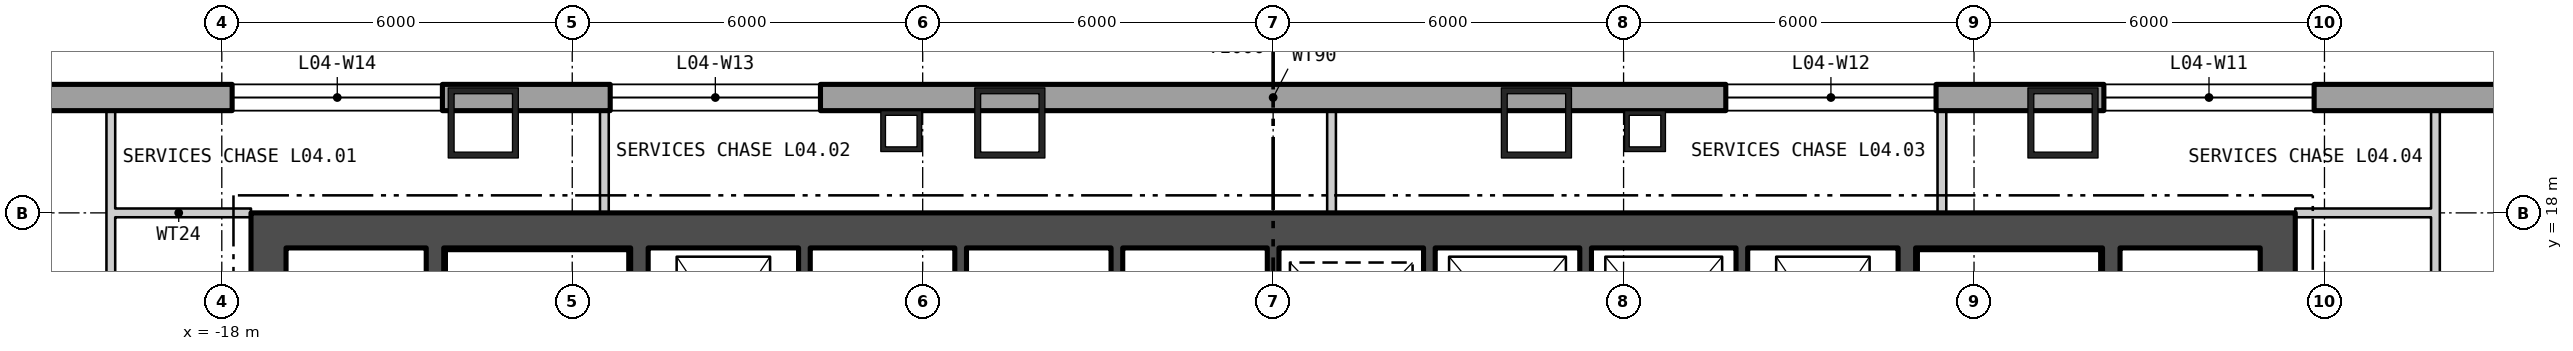
"""IFC4 building model, lengths in metres.
Left out: names, types, materials, properties, quantities, classifications, styles, units other than length and angle.
Written with IfcOpenShell. Run it as: python <this file> out.ifc"""

import sys

from ifc_helpers import new_model, si_unit, direction, frame, frame_2d, origin, origin_2d, place, context, subcontext, project, spatial, polyline, rectangle, hollow_rectangle, outline, extrude, element, fill, save


model = new_model("IFC4")
c1 = context("Model", 3, precision=1e-05, world=origin(), true_north=direction((0.0, 1.0)))
c2 = subcontext(c1, "Body", "Model", "MODEL_VIEW")
j1 = project(units=[si_unit("LENGTHUNIT", "METRE"), si_unit("PLANEANGLEUNIT", "RADIAN")], contexts=[c1])
p1 = place(None, origin())
s1 = spatial("IfcSite", under=j1, at=p1, CompositionType="ELEMENT")
p2 = place(p1, origin())
s2 = spatial("IfcBuilding", under=s1, at=p2, CompositionType="ELEMENT")
p3 = place(p2, frame((0.0, 0.0, 23.7)))
s3 = spatial("IfcBuildingStorey", under=s2, at=p3, CompositionType="ELEMENT", Elevation=23.7)
for number, where, z_axis, x_axis in (
    (1, (13.523, 19.54, 0.0), (0.0, 0.0, 1.0), (-1.0, 0.0, 0.0)),
    (2, (4.508, 19.54, 0.0), (0.0, 0.0, 1.0), (-1.0, 0.0, 0.0)),
    (3, (-4.508, 19.54, 0.0), (0.0, 0.0, 1.0), (-1.0, 0.0, 0.0)),
    (4, (-13.523, 19.54, 0.0), (0.0, 0.0, 1.0), (-1.0, 0.0, 0.0)),
):
    element("IfcColumn", number, at=place(p3, frame(where, z_axis=z_axis, x_axis=x_axis)), inside=s3, PredefinedType="COLUMN", context=c2, shape_type="SweptSolid", body=[
        extrude(hollow_rectangle(XDim=1.2, YDim=1.2, WallThickness=0.1, at=origin_2d()), origin(), (0.0, 0.0, 1.0), 5.1),
    ])
for number, where, z_axis, x_axis in (
    (5, (6.367, 19.4, 0.0), (0.0, 0.0, 1.0), (-1.0, 0.0, 0.0)),
    (6, (-6.367, 19.4, 0.0), (0.0, 0.0, 1.0), (-1.0, 0.0, 0.0)),
):
    element("IfcColumn", number, at=place(p3, frame(where, z_axis=z_axis, x_axis=x_axis)), inside=s3, PredefinedType="COLUMN", context=c2, shape_type="SweptSolid", body=[
        extrude(hollow_rectangle(XDim=0.7, YDim=0.7, WallThickness=0.08, at=origin_2d()), origin(), (0.0, 0.0, 1.0), 4.85),
    ])
p4 = place(p3, frame((38.775, 19.975, -0.4), z_axis=(0.0, 0.0, 1.0), x_axis=(-1.0, 0.0, 0.0)))
e7 = element("IfcWall", 7, at=p4, inside=s3, PredefinedType="SOLIDWALL", context=c2, shape_type="SweptSolid", body=[
    extrude(outline(polyline([(-0.225, -0.225), (77.775, -0.225), (77.325, 0.225), (0.225, 0.225), (-0.225, -0.225)])), origin(), (0.0, 0.0, 1.0), 5.1),
])
p5 = place(p4, frame((1.958, 0.0, 1.3)))
e8 = element("IfcOpeningElement", 8, at=p5, cuts=e7, PredefinedType="OPENING", context=c2, shape_type="SweptSolid", body=[
    extrude(rectangle(XDim=3.6, YDim=3.2, at=frame_2d((1.8, 1.6))), frame((0.0, 0.235, 0.0), z_axis=(0.0, -1.0, 0.0), x_axis=(1.0, 0.0, 0.0)), (0.0, 0.0, 1.0), 0.47),
])
p6 = place(p4, frame((8.325, 0.0, 1.3)))
e9 = element("IfcOpeningElement", 9, at=p6, cuts=e7, PredefinedType="OPENING", context=c2, shape_type="SweptSolid", body=[
    extrude(rectangle(XDim=3.6, YDim=3.2, at=frame_2d((1.8, 1.6))), frame((0.0, 0.235, 0.0), z_axis=(0.0, -1.0, 0.0), x_axis=(1.0, 0.0, 0.0)), (0.0, 0.0, 1.0), 0.47),
])
p7 = place(p4, frame((20.952, 0.0, 1.3)))
e10 = element("IfcOpeningElement", 10, at=p7, cuts=e7, PredefinedType="OPENING", context=c2, shape_type="SweptSolid", body=[
    extrude(rectangle(XDim=3.6, YDim=3.2, at=frame_2d((1.8, 1.6))), frame((0.0, 0.235, 0.0), z_axis=(0.0, -1.0, 0.0), x_axis=(1.0, 0.0, 0.0)), (0.0, 0.0, 1.0), 0.47),
])
p8 = place(p4, frame((27.425, 0.0, 1.3)))
e11 = element("IfcOpeningElement", 11, at=p8, cuts=e7, PredefinedType="OPENING", context=c2, shape_type="SweptSolid", body=[
    extrude(rectangle(XDim=3.6, YDim=3.2, at=frame_2d((1.8, 1.6))), frame((0.0, 0.235, 0.0), z_axis=(0.0, -1.0, 0.0), x_axis=(1.0, 0.0, 0.0)), (0.0, 0.0, 1.0), 0.47),
])
p9 = place(p4, frame((46.525, 0.0, 1.3)))
e12 = element("IfcOpeningElement", 12, at=p9, cuts=e7, PredefinedType="OPENING", context=c2, shape_type="SweptSolid", body=[
    extrude(rectangle(XDim=3.6, YDim=3.2, at=frame_2d((1.8, 1.6))), frame((0.0, 0.235, 0.0), z_axis=(0.0, -1.0, 0.0), x_axis=(1.0, 0.0, 0.0)), (0.0, 0.0, 1.0), 0.47),
])
p10 = place(p4, frame((52.998, 0.0, 1.3)))
e13 = element("IfcOpeningElement", 13, at=p10, cuts=e7, PredefinedType="OPENING", context=c2, shape_type="SweptSolid", body=[
    extrude(rectangle(XDim=3.6, YDim=3.2, at=frame_2d((1.8, 1.6))), frame((0.0, 0.235, 0.0), z_axis=(0.0, -1.0, 0.0), x_axis=(1.0, 0.0, 0.0)), (0.0, 0.0, 1.0), 0.47),
])
p11 = place(p4, frame((65.625, 0.0, 1.3)))
e14 = element("IfcOpeningElement", 14, at=p11, cuts=e7, PredefinedType="OPENING", context=c2, shape_type="SweptSolid", body=[
    extrude(rectangle(XDim=3.6, YDim=3.2, at=frame_2d((1.8, 1.6))), frame((0.0, 0.235, 0.0), z_axis=(0.0, -1.0, 0.0), x_axis=(1.0, 0.0, 0.0)), (0.0, 0.0, 1.0), 0.47),
])
p12 = place(p4, frame((71.992, 0.0, 1.3)))
e15 = element("IfcOpeningElement", 15, at=p12, cuts=e7, PredefinedType="OPENING", context=c2, shape_type="SweptSolid", body=[
    extrude(rectangle(XDim=3.6, YDim=3.2, at=frame_2d((1.8, 1.6))), frame((0.0, 0.235, 0.0), z_axis=(0.0, -1.0, 0.0), x_axis=(1.0, 0.0, 0.0)), (0.0, 0.0, 1.0), 0.47),
])
p13 = place(p3, frame((-17.5, 17.7, 0.0), z_axis=(0.0, 0.0, 1.0), x_axis=(1.0, 0.0, 0.0)))
e16 = element("IfcWall", 16, at=p13, inside=s3, PredefinedType="SHEAR", context=c2, shape_type="SweptSolid", body=[
    extrude(rectangle(XDim=35.0, YDim=0.6, at=frame_2d((17.5, 0.0))), origin(), (0.0, 0.0, 1.0), 4.85),
])
p14 = place(p3, frame((-17.2, 0.6, 0.0), z_axis=(0.0, 0.0, 1.0), x_axis=(0.0, 1.0, 0.0)))
e17 = element("IfcWall", 17, at=p14, inside=s3, PredefinedType="SHEAR", context=c2, shape_type="SweptSolid", body=[
    extrude(rectangle(XDim=16.8, YDim=0.6, at=frame_2d((8.4, 0.0))), origin(), (0.0, 0.0, 1.0), 4.85),
])
p15 = place(p14, frame((5.7, 0.0, 0.0)))
e18 = element("IfcOpeningElement", 18, at=p15, cuts=e17, PredefinedType="OPENING", context=c2, shape_type="SweptSolid", body=[
    extrude(rectangle(XDim=1.5, YDim=2.1, at=frame_2d((0.75, 1.05))), frame((0.0, 0.31, 0.0), z_axis=(0.0, -1.0, 0.0), x_axis=(1.0, 0.0, 0.0)), (0.0, 0.0, 1.0), 0.62),
])
p16 = place(p14, frame((0.4, 0.0, 0.0)))
e19 = element("IfcOpeningElement", 19, at=p16, cuts=e17, PredefinedType="OPENING", context=c2, shape_type="SweptSolid", body=[
    extrude(rectangle(XDim=0.9, YDim=2.1, at=frame_2d((0.45, 1.05))), frame((0.0, 0.31, 0.0), z_axis=(0.0, -1.0, 0.0), x_axis=(1.0, 0.0, 0.0)), (0.0, 0.0, 1.0), 0.62),
])
p17 = place(p14, frame((3.15, 0.0, 0.0)))
e20 = element("IfcOpeningElement", 20, at=p17, cuts=e17, PredefinedType="OPENING", context=c2, shape_type="SweptSolid", body=[
    extrude(rectangle(XDim=0.9, YDim=2.1, at=frame_2d((0.45, 1.05))), frame((0.0, 0.31, 0.0), z_axis=(0.0, -1.0, 0.0), x_axis=(1.0, 0.0, 0.0)), (0.0, 0.0, 1.0), 0.62),
])
p18 = place(p14, frame((7.816, 0.0, 0.0)))
e21 = element("IfcOpeningElement", 21, at=p18, cuts=e17, PredefinedType="OPENING", context=c2, shape_type="SweptSolid", body=[
    extrude(rectangle(XDim=1.0, YDim=2.1, at=frame_2d((0.5, 1.05))), frame((0.0, 0.31, 0.0), z_axis=(0.0, -1.0, 0.0), x_axis=(1.0, 0.0, 0.0)), (0.0, 0.0, 1.0), 0.62),
])
p19 = place(p14, frame((12.666, 0.0, 0.0)))
e22 = element("IfcOpeningElement", 22, at=p19, cuts=e17, PredefinedType="OPENING", context=c2, shape_type="SweptSolid", body=[
    extrude(rectangle(XDim=0.9, YDim=2.1, at=frame_2d((0.45, 1.05))), frame((0.0, 0.31, 0.0), z_axis=(0.0, -1.0, 0.0), x_axis=(1.0, 0.0, 0.0)), (0.0, 0.0, 1.0), 0.62),
])
p20 = place(p3, frame((17.2, 0.6, 0.0), z_axis=(0.0, 0.0, 1.0), x_axis=(0.0, 1.0, 0.0)))
e23 = element("IfcWall", 23, at=p20, inside=s3, PredefinedType="SHEAR", context=c2, shape_type="SweptSolid", body=[
    extrude(rectangle(XDim=16.8, YDim=0.6, at=frame_2d((8.4, 0.0))), origin(), (0.0, 0.0, 1.0), 4.85),
])
p21 = place(p20, frame((5.7, 0.0, 0.0)))
e24 = element("IfcOpeningElement", 24, at=p21, cuts=e23, PredefinedType="OPENING", context=c2, shape_type="SweptSolid", body=[
    extrude(rectangle(XDim=1.5, YDim=2.1, at=frame_2d((0.75, 1.05))), frame((0.0, 0.31, 0.0), z_axis=(0.0, -1.0, 0.0), x_axis=(1.0, 0.0, 0.0)), (0.0, 0.0, 1.0), 0.62),
])
p22 = place(p20, frame((1.488, 0.0, 0.0)))
e25 = element("IfcOpeningElement", 25, at=p22, cuts=e23, PredefinedType="OPENING", context=c2, shape_type="SweptSolid", body=[
    extrude(rectangle(XDim=0.9, YDim=2.1, at=frame_2d((0.45, 1.05))), frame((0.0, 0.31, 0.0), z_axis=(0.0, -1.0, 0.0), x_axis=(1.0, 0.0, 0.0)), (0.0, 0.0, 1.0), 0.62),
])
p23 = place(p20, frame((4.338, 0.0, 0.0)))
e26 = element("IfcOpeningElement", 26, at=p23, cuts=e23, PredefinedType="OPENING", context=c2, shape_type="SweptSolid", body=[
    extrude(rectangle(XDim=0.9, YDim=2.1, at=frame_2d((0.45, 1.05))), frame((0.0, 0.31, 0.0), z_axis=(0.0, -1.0, 0.0), x_axis=(1.0, 0.0, 0.0)), (0.0, 0.0, 1.0), 0.62),
])
p24 = place(p20, frame((10.483, 0.0, 0.0)))
e27 = element("IfcOpeningElement", 27, at=p24, cuts=e23, PredefinedType="OPENING", context=c2, shape_type="SweptSolid", body=[
    extrude(rectangle(XDim=0.9, YDim=2.1, at=frame_2d((0.45, 1.05))), frame((0.0, 0.31, 0.0), z_axis=(0.0, -1.0, 0.0), x_axis=(1.0, 0.0, 0.0)), (0.0, 0.0, 1.0), 0.62),
])
p25 = place(p20, frame((15.233, 0.0, 0.0)))
e28 = element("IfcOpeningElement", 28, at=p25, cuts=e23, PredefinedType="OPENING", context=c2, shape_type="SweptSolid", body=[
    extrude(rectangle(XDim=1.0, YDim=2.1, at=frame_2d((0.5, 1.05))), frame((0.0, 0.31, 0.0), z_axis=(0.0, -1.0, 0.0), x_axis=(1.0, 0.0, 0.0)), (0.0, 0.0, 1.0), 0.62),
])
p26 = place(p3, frame((-10.85, 0.6, 0.0), z_axis=(0.0, 0.0, 1.0), x_axis=(0.0, 1.0, 0.0)))
e29 = element("IfcWall", 29, at=p26, inside=s3, PredefinedType="SHEAR", context=c2, shape_type="SweptSolid", body=[
    extrude(rectangle(XDim=16.8, YDim=0.3, at=frame_2d((8.4, 0.0))), origin(), (0.0, 0.0, 1.0), 4.85),
])
p27 = place(p26, frame((5.075, 0.0, 0.0)))
e30 = element("IfcOpeningElement", 30, at=p27, cuts=e29, PredefinedType="OPENING", context=c2, shape_type="SweptSolid", body=[
    extrude(rectangle(XDim=1.25, YDim=2.1, at=frame_2d((0.625, 1.05))), frame((0.0, 0.16, 0.0), z_axis=(0.0, -1.0, 0.0), x_axis=(1.0, 0.0, 0.0)), (0.0, 0.0, 1.0), 0.32),
])
p28 = place(p26, frame((1.525, 0.0, 0.0)))
e31 = element("IfcOpeningElement", 31, at=p28, cuts=e29, PredefinedType="OPENING", context=c2, shape_type="SweptSolid", body=[
    extrude(rectangle(XDim=1.0, YDim=2.1, at=frame_2d((0.5, 1.05))), frame((0.0, 0.16, 0.0), z_axis=(0.0, -1.0, 0.0), x_axis=(1.0, 0.0, 0.0)), (0.0, 0.0, 1.0), 0.32),
])
p29 = place(p3, frame((-14.35, 0.6, 0.0), z_axis=(0.0, 0.0, 1.0), x_axis=(0.0, 1.0, 0.0)))
e32 = element("IfcWall", 32, at=p29, inside=s3, PredefinedType="SHEAR", context=c2, shape_type="SweptSolid", body=[
    extrude(rectangle(XDim=16.8, YDim=0.3, at=frame_2d((8.4, 0.0))), origin(), (0.0, 0.0, 1.0), 4.85),
])
p30 = place(p29, frame((5.7, 0.0, 0.0)))
e33 = element("IfcOpeningElement", 33, at=p30, cuts=e32, PredefinedType="OPENING", context=c2, shape_type="SweptSolid", body=[
    extrude(rectangle(XDim=1.5, YDim=2.1, at=frame_2d((0.75, 1.05))), frame((0.0, 0.16, 0.0), z_axis=(0.0, -1.0, 0.0), x_axis=(1.0, 0.0, 0.0)), (0.0, 0.0, 1.0), 0.32),
])
p31 = place(p3, frame((10.85, 0.6, 0.0), z_axis=(0.0, 0.0, 1.0), x_axis=(0.0, 1.0, 0.0)))
e34 = element("IfcWall", 34, at=p31, inside=s3, PredefinedType="SHEAR", context=c2, shape_type="SweptSolid", body=[
    extrude(rectangle(XDim=16.8, YDim=0.3, at=frame_2d((8.4, 0.0))), origin(), (0.0, 0.0, 1.0), 4.85),
])
p32 = place(p31, frame((5.075, 0.0, 0.0)))
e35 = element("IfcOpeningElement", 35, at=p32, cuts=e34, PredefinedType="OPENING", context=c2, shape_type="SweptSolid", body=[
    extrude(rectangle(XDim=1.25, YDim=2.1, at=frame_2d((0.625, 1.05))), frame((0.0, 0.16, 0.0), z_axis=(0.0, -1.0, 0.0), x_axis=(1.0, 0.0, 0.0)), (0.0, 0.0, 1.0), 0.32),
])
p33 = place(p31, frame((1.525, 0.0, 0.0)))
e36 = element("IfcOpeningElement", 36, at=p33, cuts=e34, PredefinedType="OPENING", context=c2, shape_type="SweptSolid", body=[
    extrude(rectangle(XDim=1.0, YDim=2.1, at=frame_2d((0.5, 1.05))), frame((0.0, 0.16, 0.0), z_axis=(0.0, -1.0, 0.0), x_axis=(1.0, 0.0, 0.0)), (0.0, 0.0, 1.0), 0.32),
])
p34 = place(p3, frame((14.35, 0.6, 0.0), z_axis=(0.0, 0.0, 1.0), x_axis=(0.0, 1.0, 0.0)))
e37 = element("IfcWall", 37, at=p34, inside=s3, PredefinedType="SHEAR", context=c2, shape_type="SweptSolid", body=[
    extrude(rectangle(XDim=16.8, YDim=0.3, at=frame_2d((8.4, 0.0))), origin(), (0.0, 0.0, 1.0), 4.85),
])
p35 = place(p34, frame((5.7, 0.0, 0.0)))
e38 = element("IfcOpeningElement", 38, at=p35, cuts=e37, PredefinedType="OPENING", context=c2, shape_type="SweptSolid", body=[
    extrude(rectangle(XDim=1.5, YDim=2.1, at=frame_2d((0.75, 1.05))), frame((0.0, 0.16, 0.0), z_axis=(0.0, -1.0, 0.0), x_axis=(1.0, 0.0, 0.0)), (0.0, 0.0, 1.0), 0.32),
])
for number, where, z_axis, x_axis in (
    (39, (-8.025, 14.7, 0.0), (0.0, 0.0, 1.0), (0.0, 1.0, 0.0)),
    (40, (-5.35, 14.7, 0.0), (0.0, 0.0, 1.0), (0.0, 1.0, 0.0)),
    (41, (-2.675, 14.7, 0.0), (0.0, 0.0, 1.0), (0.0, 1.0, 0.0)),
    (42, (0.0, 14.7, 0.0), (0.0, 0.0, 1.0), (0.0, 1.0, 0.0)),
    (43, (2.675, 14.7, 0.0), (0.0, 0.0, 1.0), (0.0, 1.0, 0.0)),
    (44, (5.35, 14.7, 0.0), (0.0, 0.0, 1.0), (0.0, 1.0, 0.0)),
    (45, (8.025, 14.7, 0.0), (0.0, 0.0, 1.0), (0.0, 1.0, 0.0)),
):
    element("IfcWall", number, at=place(p3, frame(where, z_axis=z_axis, x_axis=x_axis)), inside=s3, PredefinedType="SHEAR", context=c2, shape_type="SweptSolid", body=[
        extrude(rectangle(XDim=2.7, YDim=0.2, at=frame_2d((1.35, 0.0))), origin(), (0.0, 0.0, 1.0), 4.85),
    ])
p36 = place(p3, frame((-19.975, 18.0, 0.0), z_axis=(0.0, 0.0, 1.0), x_axis=(1.0, 0.0, 0.0)))
e46 = element("IfcWall", 46, at=p36, inside=s3, PredefinedType="PARTITIONING", context=c2, shape_type="SweptSolid", body=[
    extrude(rectangle(XDim=2.475, YDim=0.15, at=frame_2d((1.238, 0.0))), origin(), (0.0, 0.0, 1.0), 4.3),
])
p37 = place(p3, frame((-19.9, 1.025, 0.0), z_axis=(0.0, 0.0, 1.0), x_axis=(0.0, 1.0, 0.0)))
e47 = element("IfcWall", 47, at=p37, inside=s3, PredefinedType="PARTITIONING", context=c2, shape_type="SweptSolid", body=[
    extrude(rectangle(XDim=16.9, YDim=0.15, at=frame_2d((8.45, 0.0))), origin(), (0.0, 0.0, 1.0), 4.85),
])
p38 = place(p37, frame((8.244, 0.0, 0.0)))
e48 = element("IfcOpeningElement", 48, at=p38, cuts=e47, PredefinedType="OPENING", context=c2, shape_type="SweptSolid", body=[
    extrude(rectangle(XDim=1.8, YDim=2.1, at=frame_2d((0.9, 1.05))), frame((0.0, 0.085, 0.0), z_axis=(0.0, -1.0, 0.0), x_axis=(1.0, 0.0, 0.0)), (0.0, 0.0, 1.0), 0.17),
])
p39 = place(p3, frame((-19.9, 18.075, 0.0), z_axis=(0.0, 0.0, 1.0), x_axis=(0.0, 1.0, 0.0)))
e49 = element("IfcWall", 49, at=p39, inside=s3, PredefinedType="PARTITIONING", context=c2, shape_type="SweptSolid", body=[
    extrude(rectangle(XDim=1.675, YDim=0.15, at=frame_2d((0.838, 0.0))), origin(), (0.0, 0.0, 1.0), 4.85),
])
for number, where, z_axis, x_axis in (
    (50, (-11.45, 18.0, 0.0), (0.0, 0.0, 1.0), (0.0, 1.0, 0.0)),
    (51, (1.0, 18.0, 0.0), (0.0, 0.0, 1.0), (0.0, 1.0, 0.0)),
    (52, (11.45, 18.0, 0.0), (0.0, 0.0, 1.0), (0.0, 1.0, 0.0)),
):
    element("IfcWall", number, at=place(p3, frame(where, z_axis=z_axis, x_axis=x_axis)), inside=s3, PredefinedType="PARTITIONING", context=c2, shape_type="SweptSolid", body=[
        extrude(rectangle(XDim=1.75, YDim=0.15, at=frame_2d((0.875, 0.0))), origin(), (0.0, 0.0, 1.0), 4.85),
    ])
p40 = place(p3, frame((17.5, 18.0, 0.0), z_axis=(0.0, 0.0, 1.0), x_axis=(1.0, 0.0, 0.0)))
e53 = element("IfcWall", 53, at=p40, inside=s3, PredefinedType="PARTITIONING", context=c2, shape_type="SweptSolid", body=[
    extrude(rectangle(XDim=2.475, YDim=0.15, at=frame_2d((1.238, 0.0))), origin(), (0.0, 0.0, 1.0), 4.3),
])
p41 = place(p3, frame((19.9, 1.025, 0.0), z_axis=(0.0, 0.0, 1.0), x_axis=(0.0, 1.0, 0.0)))
e54 = element("IfcWall", 54, at=p41, inside=s3, PredefinedType="PARTITIONING", context=c2, shape_type="SweptSolid", body=[
    extrude(rectangle(XDim=16.9, YDim=0.15, at=frame_2d((8.45, 0.0))), origin(), (0.0, 0.0, 1.0), 4.85),
])
p42 = place(p41, frame((7.237, 0.0, 0.0)))
e55 = element("IfcOpeningElement", 55, at=p42, cuts=e54, PredefinedType="OPENING", context=c2, shape_type="SweptSolid", body=[
    extrude(rectangle(XDim=1.8, YDim=2.1, at=frame_2d((0.9, 1.05))), frame((0.0, 0.085, 0.0), z_axis=(0.0, -1.0, 0.0), x_axis=(1.0, 0.0, 0.0)), (0.0, 0.0, 1.0), 0.17),
])
p43 = place(p3, frame((19.9, 18.075, 0.0), z_axis=(0.0, 0.0, 1.0), x_axis=(0.0, 1.0, 0.0)))
e56 = element("IfcWall", 56, at=p43, inside=s3, PredefinedType="PARTITIONING", context=c2, shape_type="SweptSolid", body=[
    extrude(rectangle(XDim=1.675, YDim=0.15, at=frame_2d((0.838, 0.0))), origin(), (0.0, 0.0, 1.0), 4.85),
])
p44 = place(p7, origin())
e57 = element("IfcWindow", 57, at=p44, inside=s3, PartitioningType="SINGLE_PANEL", PredefinedType="WINDOW", context=c2, shape_type="SweptSolid", body=[
    extrude(rectangle(XDim=3.6, YDim=3.2, at=frame_2d((1.8, 1.6))), frame((0.0, 0.105, 0.0), z_axis=(0.0, -1.0, 0.0), x_axis=(1.0, 0.0, 0.0)), (0.0, 0.0, 1.0), 0.06),
])
fill(e10, e57)
p45 = place(p8, origin())
e58 = element("IfcWindow", 58, at=p45, inside=s3, PartitioningType="SINGLE_PANEL", PredefinedType="WINDOW", context=c2, shape_type="SweptSolid", body=[
    extrude(rectangle(XDim=3.6, YDim=3.2, at=frame_2d((1.8, 1.6))), frame((0.0, 0.105, 0.0), z_axis=(0.0, -1.0, 0.0), x_axis=(1.0, 0.0, 0.0)), (0.0, 0.0, 1.0), 0.06),
])
fill(e11, e58)
p46 = place(p9, origin())
e59 = element("IfcWindow", 59, at=p46, inside=s3, PartitioningType="SINGLE_PANEL", PredefinedType="WINDOW", context=c2, shape_type="SweptSolid", body=[
    extrude(rectangle(XDim=3.6, YDim=3.2, at=frame_2d((1.8, 1.6))), frame((0.0, 0.105, 0.0), z_axis=(0.0, -1.0, 0.0), x_axis=(1.0, 0.0, 0.0)), (0.0, 0.0, 1.0), 0.06),
])
fill(e12, e59)
p47 = place(p10, origin())
e60 = element("IfcWindow", 60, at=p47, inside=s3, PartitioningType="SINGLE_PANEL", PredefinedType="WINDOW", context=c2, shape_type="SweptSolid", body=[
    extrude(rectangle(XDim=3.6, YDim=3.2, at=frame_2d((1.8, 1.6))), frame((0.0, 0.105, 0.0), z_axis=(0.0, -1.0, 0.0), x_axis=(1.0, 0.0, 0.0)), (0.0, 0.0, 1.0), 0.06),
])
fill(e13, e60)
save(model, sys.argv[1])
